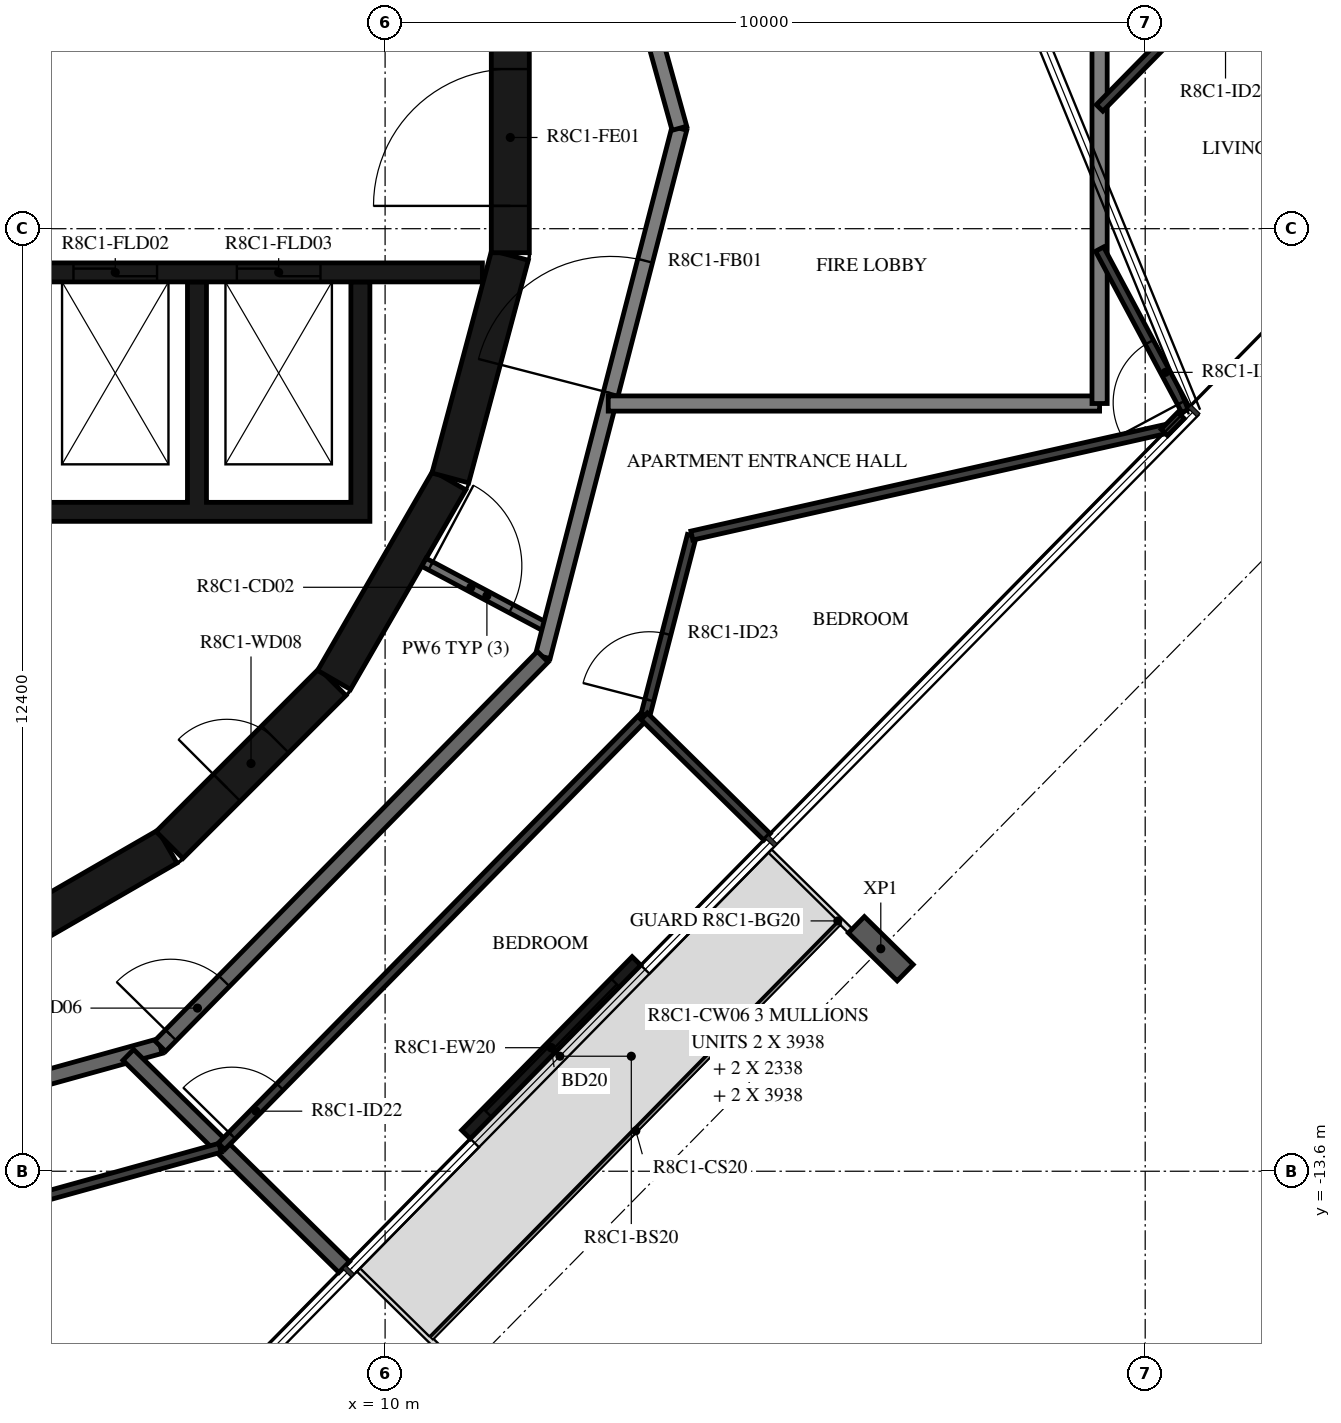
"""IFC4 building model, lengths in metres.
Left out: names, types, materials, properties, quantities, classifications, styles, units other than length and angle.
Written with IfcOpenShell. Run it as: python <this file> out.ifc"""

import sys

from ifc_helpers import new_model, si_unit, direction, frame, frame_2d, origin, origin_2d, place, context, subcontext, project, spatial, polyline, rectangle, i_section, outline, extrude, element, fill, save


model = new_model("IFC4")
c1 = context("Model", 3, precision=1e-05, world=origin(), true_north=direction((0.0, 1.0)))
c2 = subcontext(c1, "Body", "Model", "MODEL_VIEW")
j1 = project(units=[si_unit("LENGTHUNIT", "METRE"), si_unit("PLANEANGLEUNIT", "RADIAN")], contexts=[c1])
p1 = place(None, origin())
s1 = spatial("IfcSite", under=j1, at=p1, CompositionType="ELEMENT")
p2 = place(p1, origin())
s2 = spatial("IfcBuilding", under=s1, at=p2, CompositionType="ELEMENT")
p3 = place(p2, frame((0.0, 0.0, 322.7)))
s3 = spatial("IfcBuildingStorey", under=s2, at=p3, CompositionType="ELEMENT", Elevation=322.7)
p4 = place(p3, frame((16.521, -10.673, -0.38), z_axis=(0.0, 0.0, 1.0), x_axis=(-0.70090935439, -0.713250360623, 0.0)))
e1 = element("IfcColumn", 1, at=p4, inside=s3, PredefinedType="COLUMN", context=c2, shape_type="SweptSolid", body=[
    extrude(i_section(OverallWidth=0.3, OverallDepth=0.9, WebThickness=0.019, FlangeThickness=0.035, FilletRadius=0.03, at=origin_2d()), origin(), (0.0, 0.0, 1.0), 2.616),
])
p5 = place(p3, frame((11.064, -13.116, 0.0), z_axis=(0.0, 0.0, 1.0), x_axis=(0.700900076932, 0.713259477439, 0.0)))
e2 = element("IfcWall", 2, at=p5, inside=s3, PredefinedType="STANDARD", context=c2, shape_type="SweptSolid", body=[
    extrude(rectangle(XDim=3.2, YDim=0.16, at=frame_2d((1.6, 0.0))), origin(), (0.0, 0.0, 1.0), 3.05),
])
p6 = place(p5, frame((0.4, 0.0, 0.0)))
e3 = element("IfcOpeningElement", 3, at=p6, cuts=e2, PredefinedType="OPENING", context=c2, shape_type="SweptSolid", body=[
    extrude(rectangle(XDim=2.4, YDim=2.4, at=frame_2d((1.2, 1.2))), frame((0.0, 0.09, 0.0), z_axis=(0.0, -1.0, 0.0), x_axis=(1.0, 0.0, 0.0)), (0.0, 0.0, 1.0), 0.18),
])
p7 = place(p3, frame((4.51, -10.845, 0.0), z_axis=(0.0, 0.0, 1.0), x_axis=(0.865975092491, 0.500087131594, 0.0)))
e4 = element("IfcWall", 4, at=p7, inside=s3, PredefinedType="SHEAR", context=c2, shape_type="SweptSolid", body=[
    extrude(rectangle(XDim=3.033, YDim=0.5, at=frame_2d((1.516, 0.0))), origin(), (0.0, 0.0, 1.0), 3.05),
])
p8 = place(p3, frame((7.164, -9.308, 0.0), z_axis=(0.0, 0.0, 1.0), x_axis=(0.707106781187, 0.707106781187, 0.0)))
e5 = element("IfcWall", 5, at=p8, inside=s3, PredefinedType="SHEAR", context=c2, shape_type="SweptSolid", body=[
    extrude(rectangle(XDim=3.032, YDim=0.5, at=frame_2d((1.516, 0.0))), origin(), (0.0, 0.0, 1.0), 3.05),
])
p9 = place(p8, frame((1.066, 0.0, 0.0)))
e6 = element("IfcOpeningElement", 6, at=p9, cuts=e5, PredefinedType="OPENING", context=c2, shape_type="SweptSolid", body=[
    extrude(rectangle(XDim=0.9, YDim=2.1, at=frame_2d((0.45, 1.05))), frame((0.0, 0.26, 0.0), z_axis=(0.0, -1.0, 0.0), x_axis=(1.0, 0.0, 0.0)), (0.0, 0.0, 1.0), 0.52),
])
for number, where, z_axis, x_axis in (
    (7, (9.329, -7.137, 0.0), (0.0, 0.0, 1.0), (0.5, 0.866, 0.0)),
    (8, (10.858, -4.479, 0.0), (0.0, 0.0, 1.0), (0.259, 0.966, 0.0)),
):
    element("IfcWall", number, at=place(p3, frame(where, z_axis=z_axis, x_axis=x_axis)), inside=s3, PredefinedType="SHEAR", context=c2, shape_type="SweptSolid", body=[
        extrude(rectangle(XDim=3.033, YDim=0.5, at=frame_2d((1.516, 0.0))), origin(), (0.0, 0.0, 1.0), 3.05),
    ])
p10 = place(p3, frame((11.647, -1.516, 0.0), z_axis=(0.0, 0.0, 1.0), x_axis=(0.0, 1.0, 0.0)))
e9 = element("IfcWall", 9, at=p10, inside=s3, PredefinedType="SHEAR", context=c2, shape_type="SweptSolid", body=[
    extrude(rectangle(XDim=3.033, YDim=0.5, at=frame_2d((1.516, 0.0))), origin(), (0.0, 0.0, 1.0), 3.05),
])
p11 = place(p10, frame((0.616, 0.0, 0.0)))
e10 = element("IfcOpeningElement", 10, at=p11, cuts=e9, PredefinedType="OPENING", context=c2, shape_type="SweptSolid", body=[
    extrude(rectangle(XDim=1.8, YDim=2.1, at=frame_2d((0.9, 1.05))), frame((0.0, 0.26, 0.0), z_axis=(0.0, -1.0, 0.0), x_axis=(1.0, 0.0, 0.0)), (0.0, 0.0, 1.0), 0.52),
])
p12 = place(p3, origin())
e11 = element("IfcWall", 11, at=p12, inside=s3, PredefinedType="SHEAR", context=c2, shape_type="SweptSolid", body=[
    extrude(outline(polyline([(9.8, -5.05), (9.8, -4.8), (9.8, -1.9), (9.55, -1.9), (9.55, -4.8), (7.65, -4.8), (7.65, -1.9), (7.4, -1.9), (7.4, -4.8), (5.5, -4.8), (5.5, -1.9), (5.25, -1.9), (5.25, -4.8), (3.35, -4.8), (3.35, -1.9), (3.1, -1.9), (3.1, -4.8), (1.2, -4.8), (1.2, -1.9), (0.95, -1.9), (0.95, -4.8), (-0.95, -4.8), (-0.95, -1.9), (-1.2, -1.9), (-1.2, -4.8), (-3.1, -4.8), (-3.1, -1.9), (-3.35, -1.9), (-3.35, -4.8), (-5.25, -4.8), (-5.25, -1.9), (-5.5, -1.9), (-5.5, -4.8), (-9.55, -4.8), (-9.55, -1.9), (-9.8, -1.9), (-9.8, -4.8), (-9.8, -5.05), (9.8, -5.05)])), origin(), (0.0, 0.0, 1.0), 3.05),
])
p13 = place(p3, frame((3.35, -1.775, 0.0), z_axis=(0.0, 0.0, 1.0), x_axis=(1.0, 0.0, 0.0)))
e12 = element("IfcWall", 12, at=p13, inside=s3, PredefinedType="SHEAR", context=c2, shape_type="SweptSolid", body=[
    extrude(rectangle(XDim=7.93, YDim=0.25, at=frame_2d((3.965, 0.0))), origin(), (0.0, 0.0, 1.0), 3.05),
])
p14 = place(p13, frame((0.4, 0.0, 0.0)))
e13 = element("IfcOpeningElement", 13, at=p14, cuts=e12, PredefinedType="OPENING", context=c2, shape_type="SweptSolid", body=[
    extrude(rectangle(XDim=1.1, YDim=2.4, at=frame_2d((0.55, 1.2))), frame((0.0, 0.135, 0.0), z_axis=(0.0, -1.0, 0.0), x_axis=(1.0, 0.0, 0.0)), (0.0, 0.0, 1.0), 0.27),
])
p15 = place(p13, frame((2.55, 0.0, 0.0)))
e14 = element("IfcOpeningElement", 14, at=p15, cuts=e12, PredefinedType="OPENING", context=c2, shape_type="SweptSolid", body=[
    extrude(rectangle(XDim=1.1, YDim=2.4, at=frame_2d((0.55, 1.2))), frame((0.0, 0.135, 0.0), z_axis=(0.0, -1.0, 0.0), x_axis=(1.0, 0.0, 0.0)), (0.0, 0.0, 1.0), 0.27),
])
p16 = place(p13, frame((4.7, 0.0, 0.0)))
e15 = element("IfcOpeningElement", 15, at=p16, cuts=e12, PredefinedType="OPENING", context=c2, shape_type="SweptSolid", body=[
    extrude(rectangle(XDim=1.1, YDim=2.4, at=frame_2d((0.55, 1.2))), frame((0.0, 0.135, 0.0), z_axis=(0.0, -1.0, 0.0), x_axis=(1.0, 0.0, 0.0)), (0.0, 0.0, 1.0), 0.27),
])
p17 = place(p3, frame((10.511, -5.589, 0.0), z_axis=(0.0, 0.0, 1.0), x_axis=(0.882957311919, -0.469453283437, 0.0)))
e16 = element("IfcWall", 16, at=p17, inside=s3, PredefinedType="PARTITIONING", context=c2, shape_type="SweptSolid", body=[
    extrude(rectangle(XDim=1.876, YDim=0.12, at=frame_2d((0.938, 0.0))), origin(), (0.0, 0.0, 1.0), 3.05),
])
p18 = place(p17, frame((0.1, 0.0, 0.0)))
e17 = element("IfcOpeningElement", 17, at=p18, cuts=e16, PredefinedType="OPENING", context=c2, shape_type="SweptSolid", body=[
    extrude(rectangle(XDim=1.2, YDim=2.1, at=frame_2d((0.6, 1.05))), frame((0.0, 0.07, 0.0), z_axis=(0.0, -1.0, 0.0), x_axis=(1.0, 0.0, 0.0)), (0.0, 0.0, 1.0), 0.14),
])
p19 = place(p3, frame((12.074, -6.831, 0.0), z_axis=(0.0, 0.0, 1.0), x_axis=(0.250391063186, 0.968144780225, 0.0)))
e18 = element("IfcWall", 18, at=p19, inside=s3, PredefinedType="STANDARD", context=c2, shape_type="SweptSolid", body=[
    extrude(rectangle(XDim=7.181, YDim=0.2, at=frame_2d((3.591, 0.0))), origin(), (0.0, 0.0, 1.0), 3.05),
])
p20 = place(p19, frame((3.581, 0.0, 0.0)))
e19 = element("IfcOpeningElement", 19, at=p20, cuts=e18, PredefinedType="OPENING", context=c2, shape_type="SweptSolid", body=[
    extrude(rectangle(XDim=1.8, YDim=2.1, at=frame_2d((0.9, 1.05))), frame((0.0, 0.11, 0.0), z_axis=(0.0, -1.0, 0.0), x_axis=(1.0, 0.0, 0.0)), (0.0, 0.0, 1.0), 0.22),
])
p21 = place(p3, frame((13.872, 0.121, 0.0), z_axis=(0.0, 0.0, 1.0), x_axis=(-0.267291928416, 0.963615600228, 0.0)))
e20 = element("IfcWall", 20, at=p21, inside=s3, PredefinedType="STANDARD", context=c2, shape_type="SweptSolid", body=[
    extrude(rectangle(XDim=3.507, YDim=0.2, at=frame_2d((1.753, 0.0))), origin(), (0.0, 0.0, 1.0), 3.05),
])
p22 = place(p3, frame((0.121, -13.872, 0.0), z_axis=(0.0, 0.0, 1.0), x_axis=(0.963625960674, 0.267254575108, 0.0)))
e21 = element("IfcWall", 21, at=p22, inside=s3, PredefinedType="STANDARD", context=c2, shape_type="SweptSolid", body=[
    extrude(rectangle(XDim=7.181, YDim=0.2, at=frame_2d((3.591, 0.0))), origin(), (0.0, 0.0, 1.0), 3.05),
])
p23 = place(p3, frame((7.041, -11.953, 0.0), z_axis=(0.0, 0.0, 1.0), x_axis=(0.70090916255, 0.713250549143, 0.0)))
e22 = element("IfcWall", 22, at=p23, inside=s3, PredefinedType="STANDARD", context=c2, shape_type="SweptSolid", body=[
    extrude(rectangle(XDim=7.181, YDim=0.2, at=frame_2d((3.59, 0.0))), origin(), (0.0, 0.0, 1.0), 3.05),
])
p24 = place(p23, frame((0.2, 0.0, 0.0)))
e23 = element("IfcOpeningElement", 23, at=p24, cuts=e22, PredefinedType="OPENING", context=c2, shape_type="SweptSolid", body=[
    extrude(rectangle(XDim=1.0, YDim=2.1, at=frame_2d((0.5, 1.05))), frame((0.0, 0.11, 0.0), z_axis=(0.0, -1.0, 0.0), x_axis=(1.0, 0.0, 0.0)), (0.0, 0.0, 1.0), 0.22),
])
p25 = place(p3, frame((12.936, -3.5, 0.0), z_axis=(0.0, 0.0, 1.0), x_axis=(1.0, 0.0, 0.0)))
e24 = element("IfcWall", 24, at=p25, inside=s3, PredefinedType="STANDARD", context=c2, shape_type="SweptSolid", body=[
    extrude(rectangle(XDim=6.464, YDim=0.2, at=frame_2d((3.232, 0.0))), origin(), (0.0, 0.0, 1.0), 3.05),
])
p26 = place(p3, frame((19.4, -3.5, 0.0), z_axis=(0.0, 0.0, 1.0), x_axis=(0.0, 1.0, 0.0)))
e25 = element("IfcWall", 25, at=p26, inside=s3, PredefinedType="STANDARD", context=c2, shape_type="SweptSolid", body=[
    extrude(rectangle(XDim=6.954, YDim=0.2, at=frame_2d((3.477, 0.0))), origin(), (0.0, 0.0, 1.0), 3.05),
])
p27 = place(p3, frame((9.462, -14.861, 0.0), z_axis=(0.0, 0.0, 1.0), x_axis=(-0.713302018318, 0.700856783276, 0.0)))
e26 = element("IfcWall", 26, at=p27, inside=s3, PredefinedType="STANDARD", context=c2, shape_type="SweptSolid", body=[
    extrude(rectangle(XDim=3.982, YDim=0.2, at=frame_2d((1.991, 0.0))), origin(), (0.0, 0.0, 1.0), 3.05),
])
p28 = place(p3, frame((0.135, -15.425, 0.0), z_axis=(0.0, 0.0, 1.0), x_axis=(0.963633899075, 0.267225950373, 0.0)))
e27 = element("IfcWall", 27, at=p28, inside=s3, PredefinedType="PARTITIONING", context=c2, shape_type="SweptSolid", body=[
    extrude(rectangle(XDim=7.985, YDim=0.12, at=frame_2d((3.992, 0.0))), origin(), (0.0, 0.0, 1.0), 3.05),
])
p29 = place(p28, frame((0.2, 0.0, 0.0)))
e28 = element("IfcOpeningElement", 28, at=p29, cuts=e27, PredefinedType="OPENING", context=c2, shape_type="SweptSolid", body=[
    extrude(rectangle(XDim=0.8, YDim=2.1, at=frame_2d((0.4, 1.05))), frame((0.0, 0.07, 0.0), z_axis=(0.0, -1.0, 0.0), x_axis=(1.0, 0.0, 0.0)), (0.0, 0.0, 1.0), 0.14),
])
p30 = place(p28, frame((3.914, 0.0, 0.0)))
e29 = element("IfcOpeningElement", 29, at=p30, cuts=e27, PredefinedType="OPENING", context=c2, shape_type="SweptSolid", body=[
    extrude(rectangle(XDim=0.9, YDim=2.1, at=frame_2d((0.45, 1.05))), frame((0.0, 0.07, 0.0), z_axis=(0.0, -1.0, 0.0), x_axis=(1.0, 0.0, 0.0)), (0.0, 0.0, 1.0), 0.14),
])
p31 = place(p3, frame((20.535, -3.593, 0.0), z_axis=(0.0, 0.0, 1.0), x_axis=(-0.471340561072, 0.881951288614, 0.0)))
e30 = element("IfcWall", 30, at=p31, inside=s3, PredefinedType="PARTITIONING", context=c2, shape_type="SweptSolid", body=[
    extrude(rectangle(XDim=2.408, YDim=0.12, at=frame_2d((1.204, 0.0))), origin(), (0.0, 0.0, 1.0), 3.05),
])
p32 = place(p31, frame((0.12, 0.0, 0.0)))
e31 = element("IfcOpeningElement", 31, at=p32, cuts=e30, PredefinedType="OPENING", context=c2, shape_type="SweptSolid", body=[
    extrude(rectangle(XDim=0.9, YDim=2.1, at=frame_2d((0.45, 1.05))), frame((0.0, 0.07, 0.0), z_axis=(0.0, -1.0, 0.0), x_axis=(1.0, 0.0, 0.0)), (0.0, 0.0, 1.0), 0.14),
])
p33 = place(p3, frame((7.846, -13.273, 0.0), z_axis=(0.0, 0.0, 1.0), x_axis=(0.700911018066, 0.713248725728, 0.0)))
e32 = element("IfcWall", 32, at=p33, inside=s3, PredefinedType="PARTITIONING", context=c2, shape_type="SweptSolid", body=[
    extrude(rectangle(XDim=7.935, YDim=0.12, at=frame_2d((3.968, 0.0))), origin(), (0.0, 0.0, 1.0), 3.05),
])
p34 = place(p33, frame((0.2, 0.0, 0.0)))
e33 = element("IfcOpeningElement", 33, at=p34, cuts=e32, PredefinedType="OPENING", context=c2, shape_type="SweptSolid", body=[
    extrude(rectangle(XDim=0.9, YDim=2.1, at=frame_2d((0.45, 1.05))), frame((0.0, 0.07, 0.0), z_axis=(0.0, -1.0, 0.0), x_axis=(1.0, 0.0, 0.0)), (0.0, 0.0, 1.0), 0.14),
])
p35 = place(p3, frame((13.426, -7.596, 0.0), z_axis=(0.0, 0.0, 1.0), x_axis=(0.250402253482, 0.968141886012, 0.0)))
e34 = element("IfcWall", 34, at=p35, inside=s3, PredefinedType="PARTITIONING", context=c2, shape_type="SweptSolid", body=[
    extrude(rectangle(XDim=2.437, YDim=0.12, at=frame_2d((1.218, 0.0))), origin(), (0.0, 0.0, 1.0), 3.05),
])
p36 = place(p35, frame((0.2, 0.0, 0.0)))
e35 = element("IfcOpeningElement", 35, at=p36, cuts=e34, PredefinedType="OPENING", context=c2, shape_type="SweptSolid", body=[
    extrude(rectangle(XDim=0.9, YDim=2.1, at=frame_2d((0.45, 1.05))), frame((0.0, 0.07, 0.0), z_axis=(0.0, -1.0, 0.0), x_axis=(1.0, 0.0, 0.0)), (0.0, 0.0, 1.0), 0.14),
])
p37 = place(p3, frame((14.036, -5.237, 0.0), z_axis=(0.0, 0.0, 1.0), x_axis=(0.975645756324, 0.219352132805, 0.0)))
e36 = element("IfcWall", 36, at=p37, inside=s3, PredefinedType="PARTITIONING", context=c2, shape_type="SweptSolid", body=[
    extrude(rectangle(XDim=6.424, YDim=0.12, at=frame_2d((3.212, 0.0))), origin(), (0.0, 0.0, 1.0), 3.05),
])
p38 = place(p3, frame((20.471, -3.657, 0.0), z_axis=(0.0, 0.0, 1.0), x_axis=(-0.700842635321, -0.713315919153, 0.0)))
e37 = element("IfcWall", 37, at=p38, inside=s3, PredefinedType="PARTITIONING", context=c2, shape_type="SweptSolid", body=[
    extrude(rectangle(XDim=0.313, YDim=0.12, at=frame_2d((0.157, 0.0))), origin(), (0.0, 0.0, 1.0), 3.05),
])
p39 = place(p3, frame((20.654, 1.665, 0.0), z_axis=(0.0, 0.0, 1.0), x_axis=(-0.700870484553, -0.713288555833, 0.0)))
e38 = element("IfcWall", 38, at=p39, inside=s3, PredefinedType="PARTITIONING", context=c2, shape_type="SweptSolid", body=[
    extrude(rectangle(XDim=1.789, YDim=0.12, at=frame_2d((0.895, 0.0))), origin(), (0.0, 0.0, 1.0), 3.05),
])
p40 = place(p3, frame((15.024, -9.201, 0.0), z_axis=(0.0, 0.0, 1.0), x_axis=(-0.713331704042, 0.700826569137, 0.0)))
e39 = element("IfcWall", 39, at=p40, inside=s3, PredefinedType="PARTITIONING", context=c2, shape_type="SweptSolid", body=[
    extrude(rectangle(XDim=2.265, YDim=0.12, at=frame_2d((1.132, 0.0))), origin(), (0.0, 0.0, 1.0), 3.05),
])
p41 = place(p6, origin())
e40 = element("IfcDoor", 40, at=p41, inside=s3, OperationType="DOUBLE_DOOR_SLIDING", PredefinedType="DOOR", context=c2, shape_type="SweptSolid", body=[
    extrude(rectangle(XDim=2.4, YDim=2.4, at=frame_2d((1.2, 1.2))), frame((0.0, 0.025, 0.0), z_axis=(0.0, -1.0, 0.0), x_axis=(1.0, 0.0, 0.0)), (0.0, 0.0, 1.0), 0.05),
])
fill(e3, e40)
p42 = place(p11, origin())
e41 = element("IfcDoor", 41, at=p42, inside=s3, OperationType="DOUBLE_DOOR_SINGLE_SWING", PredefinedType="DOOR", context=c2, shape_type="SweptSolid", body=[
    extrude(rectangle(XDim=1.8, YDim=2.1, at=frame_2d((0.9, 1.05))), frame((0.0, 0.025, 0.0), z_axis=(0.0, -1.0, 0.0), x_axis=(1.0, 0.0, 0.0)), (0.0, 0.0, 1.0), 0.05),
])
fill(e10, e41)
p43 = place(p15, origin())
e42 = element("IfcDoor", 42, at=p43, inside=s3, OperationType="DOUBLE_DOOR_SLIDING", PredefinedType="DOOR", context=c2, shape_type="SweptSolid", body=[
    extrude(rectangle(XDim=1.1, YDim=2.4, at=frame_2d((0.55, 1.2))), frame((0.0, 0.025, 0.0), z_axis=(0.0, -1.0, 0.0), x_axis=(1.0, 0.0, 0.0)), (0.0, 0.0, 1.0), 0.05),
])
fill(e14, e42)
p44 = place(p16, origin())
e43 = element("IfcDoor", 43, at=p44, inside=s3, OperationType="DOUBLE_DOOR_SLIDING", PredefinedType="DOOR", context=c2, shape_type="SweptSolid", body=[
    extrude(rectangle(XDim=1.1, YDim=2.4, at=frame_2d((0.55, 1.2))), frame((0.0, 0.025, 0.0), z_axis=(0.0, -1.0, 0.0), x_axis=(1.0, 0.0, 0.0)), (0.0, 0.0, 1.0), 0.05),
])
fill(e15, e43)
p45 = place(p9, origin())
e44 = element("IfcDoor", 44, at=p45, inside=s3, OperationType="SINGLE_SWING_RIGHT", PredefinedType="DOOR", context=c2, shape_type="SweptSolid", body=[
    extrude(rectangle(XDim=0.9, YDim=2.1, at=frame_2d((0.45, 1.05))), frame((0.0, 0.025, 0.0), z_axis=(0.0, -1.0, 0.0), x_axis=(1.0, 0.0, 0.0)), (0.0, 0.0, 1.0), 0.05),
])
fill(e6, e44)
p46 = place(p24, origin())
e45 = element("IfcDoor", 45, at=p46, inside=s3, OperationType="SINGLE_SWING_LEFT", PredefinedType="DOOR", context=c2, shape_type="SweptSolid", body=[
    extrude(rectangle(XDim=1.0, YDim=2.1, at=frame_2d((0.5, 1.05))), frame((0.0, 0.025, 0.0), z_axis=(0.0, -1.0, 0.0), x_axis=(1.0, 0.0, 0.0)), (0.0, 0.0, 1.0), 0.05),
])
fill(e23, e45)
p47 = place(p32, origin())
e46 = element("IfcDoor", 46, at=p47, inside=s3, OperationType="SINGLE_SWING_RIGHT", PredefinedType="DOOR", context=c2, shape_type="SweptSolid", body=[
    extrude(rectangle(XDim=0.9, YDim=2.1, at=frame_2d((0.45, 1.05))), frame((0.0, 0.025, 0.0), z_axis=(0.0, -1.0, 0.0), x_axis=(1.0, 0.0, 0.0)), (0.0, 0.0, 1.0), 0.05),
])
fill(e31, e46)
p48 = place(p34, origin())
e47 = element("IfcDoor", 47, at=p48, inside=s3, OperationType="SINGLE_SWING_LEFT", PredefinedType="DOOR", context=c2, shape_type="SweptSolid", body=[
    extrude(rectangle(XDim=0.9, YDim=2.1, at=frame_2d((0.45, 1.05))), frame((0.0, 0.025, 0.0), z_axis=(0.0, -1.0, 0.0), x_axis=(1.0, 0.0, 0.0)), (0.0, 0.0, 1.0), 0.05),
])
fill(e33, e47)
p49 = place(p36, origin())
e48 = element("IfcDoor", 48, at=p49, inside=s3, OperationType="SINGLE_SWING_RIGHT", PredefinedType="DOOR", context=c2, shape_type="SweptSolid", body=[
    extrude(rectangle(XDim=0.9, YDim=2.1, at=frame_2d((0.45, 1.05))), frame((0.0, 0.025, 0.0), z_axis=(0.0, -1.0, 0.0), x_axis=(1.0, 0.0, 0.0)), (0.0, 0.0, 1.0), 0.05),
])
fill(e35, e48)
p50 = place(p18, origin())
e49 = element("IfcDoor", 49, at=p50, inside=s3, OperationType="DOUBLE_DOOR_SINGLE_SWING", PredefinedType="DOOR", context=c2, shape_type="SweptSolid", body=[
    extrude(rectangle(XDim=1.2, YDim=2.1, at=frame_2d((0.6, 1.05))), frame((0.0, 0.025, 0.0), z_axis=(0.0, -1.0, 0.0), x_axis=(1.0, 0.0, 0.0)), (0.0, 0.0, 1.0), 0.05),
])
fill(e17, e49)
p51 = place(p20, origin())
e50 = element("IfcDoor", 50, at=p51, inside=s3, OperationType="DOUBLE_DOOR_SINGLE_SWING", PredefinedType="DOOR", context=c2, shape_type="SweptSolid", body=[
    extrude(rectangle(XDim=1.8, YDim=2.1, at=frame_2d((0.9, 1.05))), frame((0.0, 0.025, 0.0), z_axis=(0.0, -1.0, 0.0), x_axis=(1.0, 0.0, 0.0)), (0.0, 0.0, 1.0), 0.05),
])
fill(e19, e50)
save(model, sys.argv[1])
